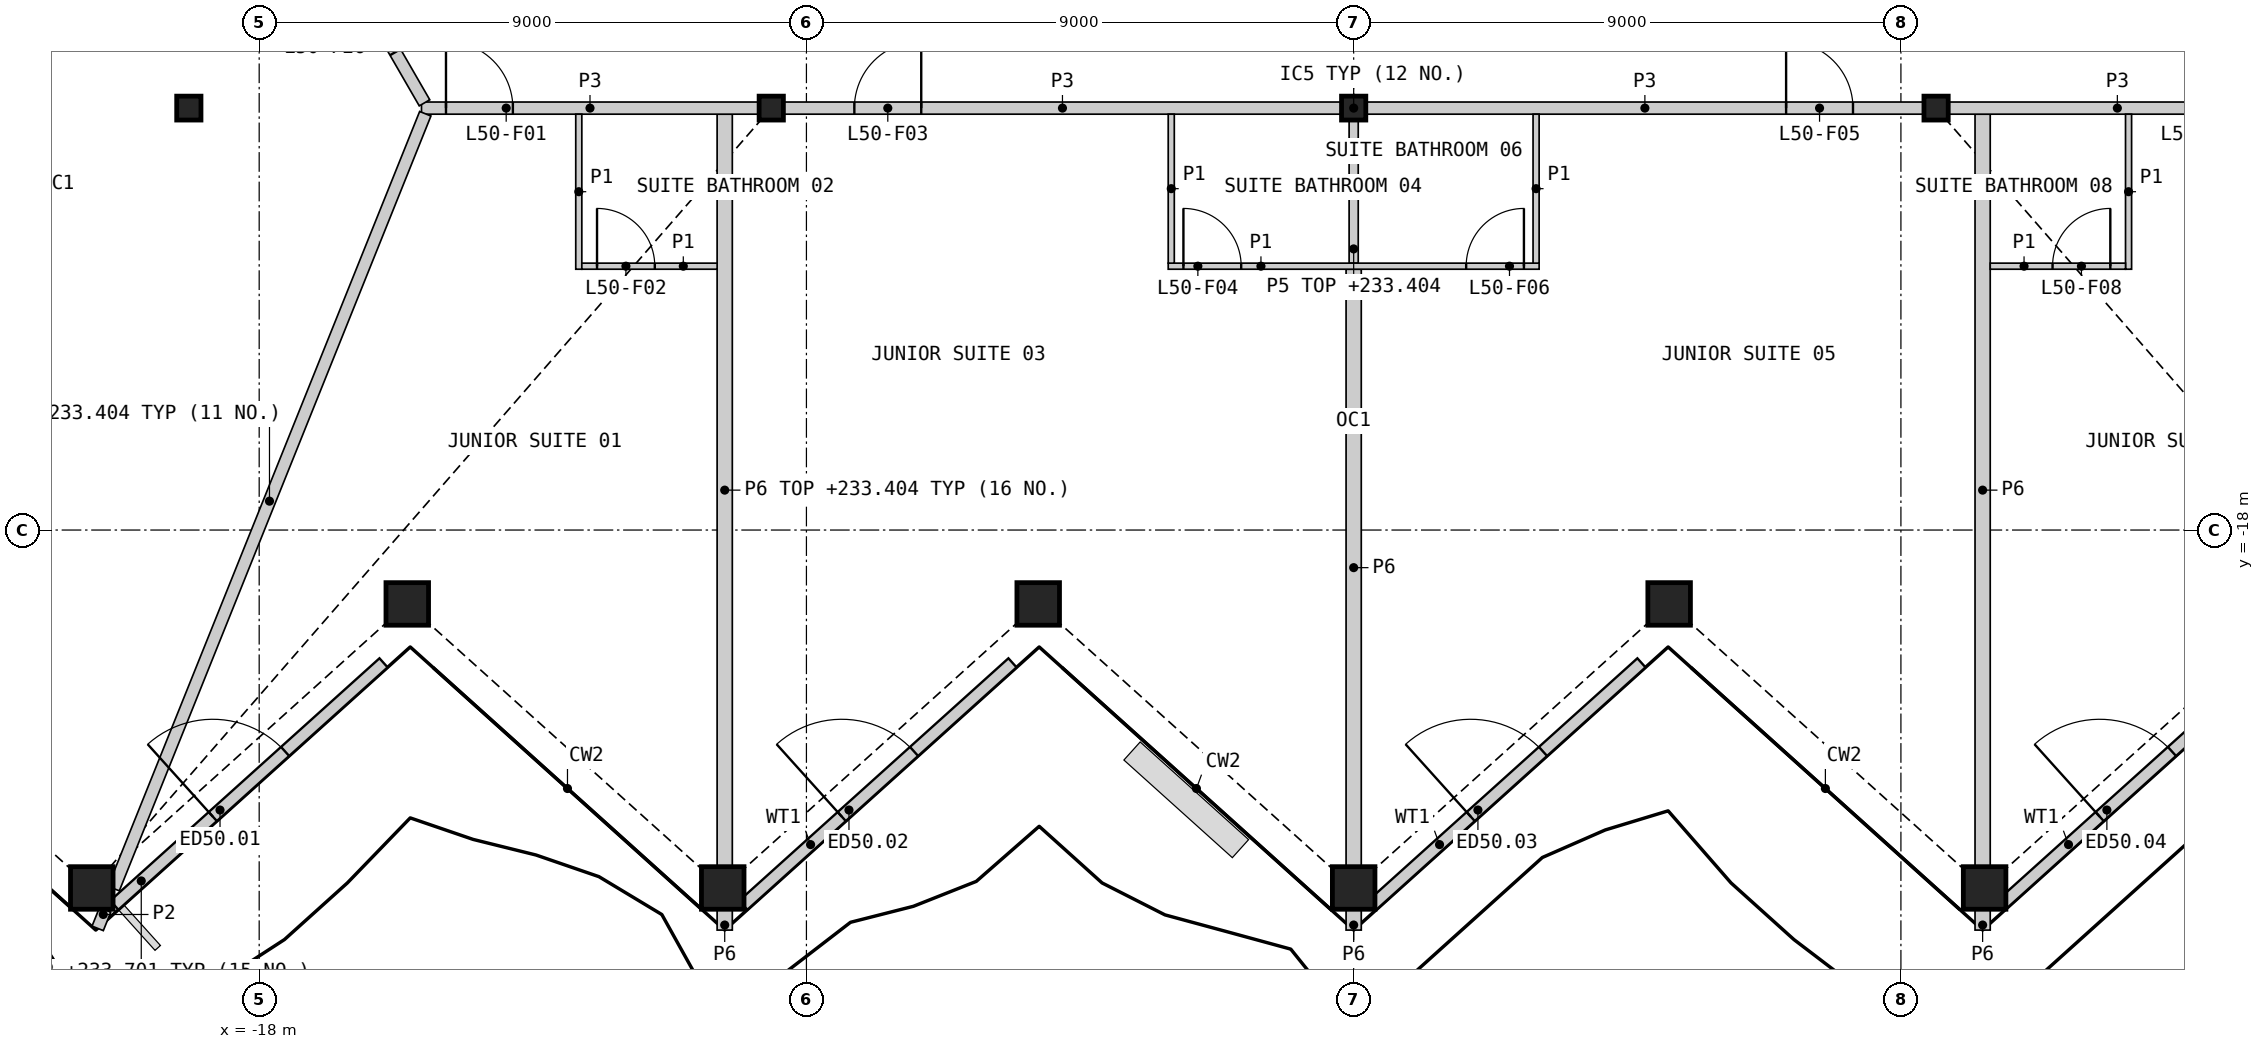
"""IFC4 building model, lengths in metres.
Left out: names, types, materials, properties, quantities, classifications, styles, units other than length and angle.
Written with IfcOpenShell. Run it as: python <this file> out.ifc"""

import sys

from ifc_helpers import new_model, si_unit, direction, frame, frame_2d, origin, origin_2d, place, context, subcontext, project, spatial, rectangle, hollow_rectangle, i_section, extrude, element, fill, save


model = new_model("IFC4")
c1 = context("Model", 3, precision=1e-05, world=origin(), true_north=direction((0.0, 1.0)))
c2 = subcontext(c1, "Body", "Model", "MODEL_VIEW")
j1 = project(units=[si_unit("LENGTHUNIT", "METRE"), si_unit("PLANEANGLEUNIT", "RADIAN")], contexts=[c1])
p1 = place(None, origin())
s1 = spatial("IfcSite", under=j1, at=p1, CompositionType="ELEMENT")
p2 = place(p1, origin())
s2 = spatial("IfcBuilding", under=s1, at=p2, CompositionType="ELEMENT")
p3 = place(p2, frame((0.0, 0.0, 231.0)))
s3 = spatial("IfcBuildingStorey", under=s2, at=p3, CompositionType="ELEMENT", Elevation=231.0)
for number, where, z_axis, x_axis in (
    (1, (-20.753, -23.887, 0.0), (0.0, 0.0, 1.0), (1.0, 0.0, 0.0)),
    (2, (-15.565, -19.215, 0.0), (0.0, 0.0, 1.0), (1.0, 0.0, 0.0)),
    (3, (-10.376, -23.887, 0.0), (0.0, 0.0, 1.0), (1.0, 0.0, 0.0)),
    (4, (-5.188, -19.215, 0.0), (0.0, 0.0, 1.0), (1.0, 0.0, 0.0)),
    (5, (0.0, -23.887, 0.0), (0.0, 0.0, 1.0), (1.0, 0.0, 0.0)),
    (6, (5.188, -19.215, 0.0), (0.0, 0.0, 1.0), (1.0, 0.0, 0.0)),
    (7, (10.376, -23.887, 0.0), (0.0, 0.0, 1.0), (1.0, 0.0, 0.0)),
):
    element("IfcColumn", number, at=place(p3, frame(where, z_axis=z_axis, x_axis=x_axis)), inside=s3, PredefinedType="COLUMN", context=c2, shape_type="SweptSolid", body=[
        extrude(hollow_rectangle(XDim=0.7, YDim=0.7, WallThickness=0.045, at=origin_2d()), origin(), (0.0, 0.0, 1.0), 3.6),
    ])
for number, where, z_axis, x_axis in (
    (8, (-19.157, -11.06, 0.0), (0.0, 0.0, 1.0), (1.0, 0.0, 0.0)),
    (9, (-9.578, -11.06, 0.0), (0.0, 0.0, 1.0), (1.0, 0.0, 0.0)),
    (10, (0.0, -11.06, 0.0), (0.0, 0.0, 1.0), (1.0, 0.0, 0.0)),
    (11, (9.578, -11.06, 0.0), (0.0, 0.0, 1.0), (1.0, 0.0, 0.0)),
):
    element("IfcColumn", number, at=place(p3, frame(where, z_axis=z_axis, x_axis=x_axis)), inside=s3, PredefinedType="COLUMN", context=c2, shape_type="SweptSolid", body=[
        extrude(i_section(OverallWidth=0.399, OverallDepth=0.393, WebThickness=0.023, FlangeThickness=0.037, at=origin_2d()), origin(), (0.0, 0.0, 1.0), 3.6),
    ])
p4 = place(p3, frame((-20.382, -24.17, 0.0), z_axis=(0.0, 0.0, 1.0), x_axis=(0.743161684399, 0.669111882155, 0.0)))
e12 = element("IfcWall", 12, at=p4, inside=s3, PredefinedType="SOLIDWALL", context=c2, shape_type="SweptSolid", body=[
    extrude(rectangle(XDim=5.958, YDim=0.2, at=frame_2d((2.979, 0.0))), origin(), (0.0, 0.0, 1.0), 2.701),
])
p5 = place(p4, frame((2.179, 0.0, 0.0)))
e13 = element("IfcOpeningElement", 13, at=p5, cuts=e12, PredefinedType="OPENING", context=c2, shape_type="SweptSolid", body=[
    extrude(rectangle(XDim=1.6, YDim=2.4, at=frame_2d((0.8, 1.2))), frame((0.0, 0.11, 0.0), z_axis=(0.0, -1.0, 0.0), x_axis=(1.0, 0.0, 0.0)), (0.0, 0.0, 1.0), 0.22),
])
p6 = place(p3, frame((-10.038, -24.17, 0.0), z_axis=(0.0, 0.0, 1.0), x_axis=(0.743143336638, 0.669132259878, 0.0)))
e14 = element("IfcWall", 14, at=p6, inside=s3, PredefinedType="SOLIDWALL", context=c2, shape_type="SweptSolid", body=[
    extrude(rectangle(XDim=5.958, YDim=0.2, at=frame_2d((2.979, 0.0))), origin(), (0.0, 0.0, 1.0), 2.701),
])
p7 = place(p6, frame((2.179, 0.0, 0.0)))
e15 = element("IfcOpeningElement", 15, at=p7, cuts=e14, PredefinedType="OPENING", context=c2, shape_type="SweptSolid", body=[
    extrude(rectangle(XDim=1.6, YDim=2.4, at=frame_2d((0.8, 1.2))), frame((0.0, 0.11, 0.0), z_axis=(0.0, -1.0, 0.0), x_axis=(1.0, 0.0, 0.0)), (0.0, 0.0, 1.0), 0.22),
])
p8 = place(p3, frame((0.305, -24.17, 0.0), z_axis=(0.0, 0.0, 1.0), x_axis=(0.743143336638, 0.669132259878, 0.0)))
e16 = element("IfcWall", 16, at=p8, inside=s3, PredefinedType="SOLIDWALL", context=c2, shape_type="SweptSolid", body=[
    extrude(rectangle(XDim=5.958, YDim=0.2, at=frame_2d((2.979, 0.0))), origin(), (0.0, 0.0, 1.0), 2.701),
])
p9 = place(p8, frame((2.179, 0.0, 0.0)))
e17 = element("IfcOpeningElement", 17, at=p9, cuts=e16, PredefinedType="OPENING", context=c2, shape_type="SweptSolid", body=[
    extrude(rectangle(XDim=1.6, YDim=2.4, at=frame_2d((0.8, 1.2))), frame((0.0, 0.11, 0.0), z_axis=(0.0, -1.0, 0.0), x_axis=(1.0, 0.0, 0.0)), (0.0, 0.0, 1.0), 0.22),
])
p10 = place(p3, frame((10.649, -24.17, 0.0), z_axis=(0.0, 0.0, 1.0), x_axis=(0.743143336638, 0.669132259878, 0.0)))
e18 = element("IfcWall", 18, at=p10, inside=s3, PredefinedType="SOLIDWALL", context=c2, shape_type="SweptSolid", body=[
    extrude(rectangle(XDim=5.958, YDim=0.2, at=frame_2d((2.979, 0.0))), origin(), (0.0, 0.0, 1.0), 2.701),
])
p11 = place(p10, frame((2.179, 0.0, 0.0)))
e19 = element("IfcOpeningElement", 19, at=p11, cuts=e18, PredefinedType="OPENING", context=c2, shape_type="SweptSolid", body=[
    extrude(rectangle(XDim=1.6, YDim=2.4, at=frame_2d((0.8, 1.2))), frame((0.0, 0.11, 0.0), z_axis=(0.0, -1.0, 0.0), x_axis=(1.0, 0.0, 0.0)), (0.0, 0.0, 1.0), 0.22),
])
for number, where, z_axis, x_axis in (
    (20, (-10.344, -23.527, 0.0), (0.0, 0.0, 1.0), (0.0, 1.0, 0.0)),
    (21, (10.344, -23.527, 0.0), (0.0, 0.0, 1.0), (0.0, 1.0, 0.0)),
):
    element("IfcWall", number, at=place(p3, frame(where, z_axis=z_axis, x_axis=x_axis)), inside=s3, PredefinedType="PARTITIONING", context=c2, shape_type="SweptSolid", body=[
        extrude(rectangle(XDim=12.366, YDim=0.25, at=frame_2d((6.183, 0.0))), origin(), (0.0, 0.0, 1.0), 2.404),
    ])
p12 = place(p3, frame((0.0, -23.527, 0.0), z_axis=(0.0, 0.0, 1.0), x_axis=(0.0, 1.0, 0.0)))
e22 = element("IfcWall", 22, at=p12, inside=s3, PredefinedType="PARTITIONING", context=c2, shape_type="SweptSolid", body=[
    extrude(rectangle(XDim=9.817, YDim=0.25, at=frame_2d((4.908, 0.0))), origin(), (0.0, 0.0, 1.0), 2.404),
])
p13 = place(p3, frame((-9.369, -11.06, 0.0), z_axis=(0.0, 0.0, 1.0), x_axis=(1.0, 0.0, 0.0)))
e23 = element("IfcWall", 23, at=p13, inside=s3, PredefinedType="PARTITIONING", context=c2, shape_type="SweptSolid", body=[
    extrude(rectangle(XDim=9.159, YDim=0.2, at=frame_2d((4.58, 0.0))), origin(), (0.0, 0.0, 1.0), 3.25),
])
p14 = place(p13, frame((1.157, 0.0, 0.0)))
e24 = element("IfcOpeningElement", 24, at=p14, cuts=e23, PredefinedType="OPENING", context=c2, shape_type="SweptSolid", body=[
    extrude(rectangle(XDim=1.1, YDim=2.1, at=frame_2d((0.55, 1.05))), frame((0.0, 0.11, 0.0), z_axis=(0.0, -1.0, 0.0), x_axis=(1.0, 0.0, 0.0)), (0.0, 0.0, 1.0), 0.22),
])
p15 = place(p3, frame((0.209, -11.06, 0.0), z_axis=(0.0, 0.0, 1.0), x_axis=(1.0, 0.0, 0.0)))
e25 = element("IfcWall", 25, at=p15, inside=s3, PredefinedType="PARTITIONING", context=c2, shape_type="SweptSolid", body=[
    extrude(rectangle(XDim=9.159, YDim=0.2, at=frame_2d((4.58, 0.0))), origin(), (0.0, 0.0, 1.0), 3.25),
])
p16 = place(p15, frame((6.902, 0.0, 0.0)))
e26 = element("IfcOpeningElement", 26, at=p16, cuts=e25, PredefinedType="OPENING", context=c2, shape_type="SweptSolid", body=[
    extrude(rectangle(XDim=1.1, YDim=2.1, at=frame_2d((0.55, 1.05))), frame((0.0, 0.11, 0.0), z_axis=(0.0, -1.0, 0.0), x_axis=(1.0, 0.0, 0.0)), (0.0, 0.0, 1.0), 0.22),
])
p17 = place(p3, frame((-15.331, -11.06, 0.0), z_axis=(0.0, 0.0, 1.0), x_axis=(1.0, 0.0, 0.0)))
e27 = element("IfcWall", 27, at=p17, inside=s3, PredefinedType="PARTITIONING", context=c2, shape_type="SweptSolid", body=[
    extrude(rectangle(XDim=5.543, YDim=0.2, at=frame_2d((2.771, 0.0))), origin(), (0.0, 0.0, 1.0), 3.25),
])
p18 = place(p17, frame((0.403, 0.0, 0.0)))
e28 = element("IfcOpeningElement", 28, at=p18, cuts=e27, PredefinedType="OPENING", context=c2, shape_type="SweptSolid", body=[
    extrude(rectangle(XDim=1.1, YDim=2.1, at=frame_2d((0.55, 1.05))), frame((0.0, 0.11, 0.0), z_axis=(0.0, -1.0, 0.0), x_axis=(1.0, 0.0, 0.0)), (0.0, 0.0, 1.0), 0.22),
])
p19 = place(p3, frame((9.788, -11.06, 0.0), z_axis=(0.0, 0.0, 1.0), x_axis=(1.0, 0.0, 0.0)))
e29 = element("IfcWall", 29, at=p19, inside=s3, PredefinedType="PARTITIONING", context=c2, shape_type="SweptSolid", body=[
    extrude(rectangle(XDim=5.543, YDim=0.2, at=frame_2d((2.771, 0.0))), origin(), (0.0, 0.0, 1.0), 3.25),
])
p20 = place(p19, frame((4.04, 0.0, 0.0)))
e30 = element("IfcOpeningElement", 30, at=p20, cuts=e29, PredefinedType="OPENING", context=c2, shape_type="SweptSolid", body=[
    extrude(rectangle(XDim=1.1, YDim=2.1, at=frame_2d((0.55, 1.05))), frame((0.0, 0.11, 0.0), z_axis=(0.0, -1.0, 0.0), x_axis=(1.0, 0.0, 0.0)), (0.0, 0.0, 1.0), 0.22),
])
p21 = place(p3, frame((-17.194, -7.66, 0.0), z_axis=(0.0, 0.0, 1.0), x_axis=(0.499989446428, -0.866031496806, 0.0)))
e31 = element("IfcWall", 31, at=p21, inside=s3, PredefinedType="PARTITIONING", context=c2, shape_type="SweptSolid", body=[
    extrude(rectangle(XDim=3.826, YDim=0.2, at=frame_2d((1.913, 0.0))), origin(), (0.0, 0.0, 1.0), 3.25),
])
p22 = place(p21, frame((1.064, 0.0, 0.0)))
e32 = element("IfcOpeningElement", 32, at=p22, cuts=e31, PredefinedType="OPENING", context=c2, shape_type="SweptSolid", body=[
    extrude(rectangle(XDim=1.8, YDim=2.1, at=frame_2d((0.9, 1.05))), frame((0.0, 0.11, 0.0), z_axis=(0.0, -1.0, 0.0), x_axis=(1.0, 0.0, 0.0)), (0.0, 0.0, 1.0), 0.22),
])
for number, where, z_axis, x_axis in (
    (33, (-10.344, -24.58, 0.0), (0.0, 0.0, 1.0), (0.0, 1.0, 0.0)),
    (34, (0.0, -24.58, 0.0), (0.0, 0.0, 1.0), (0.0, 1.0, 0.0)),
    (35, (10.344, -24.58, 0.0), (0.0, 0.0, 1.0), (0.0, 1.0, 0.0)),
):
    element("IfcWall", number, at=place(p3, frame(where, z_axis=z_axis, x_axis=x_axis)), inside=s3, PredefinedType="PARTITIONING", context=c2, shape_type="SweptSolid", body=[
        extrude(rectangle(XDim=0.333, YDim=0.25, at=frame_2d((0.167, 0.0))), origin(), (0.0, 0.0, 1.0), 2.404),
    ])
p23 = place(p3, frame((-20.393, -23.897, 0.0), z_axis=(0.0, 0.0, 1.0), x_axis=(0.373096979113, 0.927792349708, 0.0)))
e36 = element("IfcWall", 36, at=p23, inside=s3, PredefinedType="PARTITIONING", context=c2, shape_type="SweptSolid", body=[
    extrude(rectangle(XDim=13.736, YDim=0.2, at=frame_2d((6.868, 0.0))), origin(), (0.0, 0.0, 1.0), 2.404),
])
p24 = place(p3, frame((-20.656, -24.551, 0.0), z_axis=(0.0, 0.0, 1.0), x_axis=(0.372801499492, 0.927911117498, 0.0)))
e37 = element("IfcWall", 37, at=p24, inside=s3, PredefinedType="PARTITIONING", context=c2, shape_type="SweptSolid", body=[
    extrude(rectangle(XDim=0.328, YDim=0.2, at=frame_2d((0.164, 0.0))), origin(), (0.0, 0.0, 1.0), 2.404),
])
p25 = place(p3, frame((0.0, -13.61, 0.0), z_axis=(0.0, 0.0, 1.0), x_axis=(0.0, 1.0, 0.0)))
e38 = element("IfcWall", 38, at=p25, inside=s3, PredefinedType="PLUMBINGWALL", context=c2, shape_type="SweptSolid", body=[
    extrude(rectangle(XDim=2.341, YDim=0.15, at=frame_2d((1.17, 0.0))), origin(), (0.0, 0.0, 1.0), 2.404),
])
p26 = place(p3, frame((-3.05, -13.66, 0.0), z_axis=(0.0, 0.0, 1.0), x_axis=(1.0, 0.0, 0.0)))
e39 = element("IfcWall", 39, at=p26, inside=s3, PredefinedType="PARTITIONING", context=c2, shape_type="SweptSolid", body=[
    extrude(rectangle(XDim=6.1, YDim=0.1, at=frame_2d((3.05, 0.0))), origin(), (0.0, 0.0, 1.0), 2.404),
])
p27 = place(p26, frame((0.25, 0.0, 0.0)))
e40 = element("IfcOpeningElement", 40, at=p27, cuts=e39, PredefinedType="OPENING", context=c2, shape_type="SweptSolid", body=[
    extrude(rectangle(XDim=0.95, YDim=2.1, at=frame_2d((0.475, 1.05))), frame((0.0, 0.06, 0.0), z_axis=(0.0, -1.0, 0.0), x_axis=(1.0, 0.0, 0.0)), (0.0, 0.0, 1.0), 0.12),
])
p28 = place(p26, frame((4.9, 0.0, 0.0)))
e41 = element("IfcOpeningElement", 41, at=p28, cuts=e39, PredefinedType="OPENING", context=c2, shape_type="SweptSolid", body=[
    extrude(rectangle(XDim=0.95, YDim=2.1, at=frame_2d((0.475, 1.05))), frame((0.0, 0.06, 0.0), z_axis=(0.0, -1.0, 0.0), x_axis=(1.0, 0.0, 0.0)), (0.0, 0.0, 1.0), 0.12),
])
p29 = place(p3, frame((-12.744, -13.71, 0.0), z_axis=(0.0, 0.0, 1.0), x_axis=(0.0, 1.0, 0.0)))
e42 = element("IfcWall", 42, at=p29, inside=s3, PredefinedType="PARTITIONING", context=c2, shape_type="SweptSolid", body=[
    extrude(rectangle(XDim=2.55, YDim=0.1, at=frame_2d((1.275, 0.0))), origin(), (0.0, 0.0, 1.0), 2.404),
])
for number, where, z_axis, x_axis in (
    (43, (-3.0, -13.61, 0.0), (0.0, 0.0, 1.0), (0.0, 1.0, 0.0)),
    (44, (3.0, -13.61, 0.0), (0.0, 0.0, 1.0), (0.0, 1.0, 0.0)),
):
    element("IfcWall", number, at=place(p3, frame(where, z_axis=z_axis, x_axis=x_axis)), inside=s3, PredefinedType="PARTITIONING", context=c2, shape_type="SweptSolid", body=[
        extrude(rectangle(XDim=2.45, YDim=0.1, at=frame_2d((1.225, 0.0))), origin(), (0.0, 0.0, 1.0), 2.404),
    ])
p30 = place(p3, frame((12.744, -13.71, 0.0), z_axis=(0.0, 0.0, 1.0), x_axis=(0.0, 1.0, 0.0)))
e45 = element("IfcWall", 45, at=p30, inside=s3, PredefinedType="PARTITIONING", context=c2, shape_type="SweptSolid", body=[
    extrude(rectangle(XDim=2.55, YDim=0.1, at=frame_2d((1.275, 0.0))), origin(), (0.0, 0.0, 1.0), 2.404),
])
p31 = place(p3, frame((-12.694, -13.66, 0.0), z_axis=(0.0, 0.0, 1.0), x_axis=(1.0, 0.0, 0.0)))
e46 = element("IfcWall", 46, at=p31, inside=s3, PredefinedType="PARTITIONING", context=c2, shape_type="SweptSolid", body=[
    extrude(rectangle(XDim=2.225, YDim=0.1, at=frame_2d((1.113, 0.0))), origin(), (0.0, 0.0, 1.0), 2.404),
])
p32 = place(p31, frame((0.25, 0.0, 0.0)))
e47 = element("IfcOpeningElement", 47, at=p32, cuts=e46, PredefinedType="OPENING", context=c2, shape_type="SweptSolid", body=[
    extrude(rectangle(XDim=0.95, YDim=2.1, at=frame_2d((0.475, 1.05))), frame((0.0, 0.06, 0.0), z_axis=(0.0, -1.0, 0.0), x_axis=(1.0, 0.0, 0.0)), (0.0, 0.0, 1.0), 0.12),
])
p33 = place(p3, frame((10.469, -13.66, 0.0), z_axis=(0.0, 0.0, 1.0), x_axis=(1.0, 0.0, 0.0)))
e48 = element("IfcWall", 48, at=p33, inside=s3, PredefinedType="PARTITIONING", context=c2, shape_type="SweptSolid", body=[
    extrude(rectangle(XDim=2.225, YDim=0.1, at=frame_2d((1.113, 0.0))), origin(), (0.0, 0.0, 1.0), 2.404),
])
p34 = place(p33, frame((1.025, 0.0, 0.0)))
e49 = element("IfcOpeningElement", 49, at=p34, cuts=e48, PredefinedType="OPENING", context=c2, shape_type="SweptSolid", body=[
    extrude(rectangle(XDim=0.95, YDim=2.1, at=frame_2d((0.475, 1.05))), frame((0.0, 0.06, 0.0), z_axis=(0.0, -1.0, 0.0), x_axis=(1.0, 0.0, 0.0)), (0.0, 0.0, 1.0), 0.12),
])
p35 = place(p5, origin())
e50 = element("IfcDoor", 50, at=p35, inside=s3, OperationType="DOUBLE_DOOR_SINGLE_SWING", PredefinedType="DOOR", context=c2, shape_type="SweptSolid", body=[
    extrude(rectangle(XDim=1.6, YDim=2.4, at=frame_2d((0.8, 1.2))), frame((0.0, 0.025, 0.0), z_axis=(0.0, -1.0, 0.0), x_axis=(1.0, 0.0, 0.0)), (0.0, 0.0, 1.0), 0.05),
])
fill(e13, e50)
p36 = place(p7, origin())
e51 = element("IfcDoor", 51, at=p36, inside=s3, OperationType="DOUBLE_DOOR_SINGLE_SWING", PredefinedType="DOOR", context=c2, shape_type="SweptSolid", body=[
    extrude(rectangle(XDim=1.6, YDim=2.4, at=frame_2d((0.8, 1.2))), frame((0.0, 0.025, 0.0), z_axis=(0.0, -1.0, 0.0), x_axis=(1.0, 0.0, 0.0)), (0.0, 0.0, 1.0), 0.05),
])
fill(e15, e51)
p37 = place(p9, origin())
e52 = element("IfcDoor", 52, at=p37, inside=s3, OperationType="DOUBLE_DOOR_SINGLE_SWING", PredefinedType="DOOR", context=c2, shape_type="SweptSolid", body=[
    extrude(rectangle(XDim=1.6, YDim=2.4, at=frame_2d((0.8, 1.2))), frame((0.0, 0.025, 0.0), z_axis=(0.0, -1.0, 0.0), x_axis=(1.0, 0.0, 0.0)), (0.0, 0.0, 1.0), 0.05),
])
fill(e17, e52)
p38 = place(p11, origin())
e53 = element("IfcDoor", 53, at=p38, inside=s3, OperationType="DOUBLE_DOOR_SINGLE_SWING", PredefinedType="DOOR", context=c2, shape_type="SweptSolid", body=[
    extrude(rectangle(XDim=1.6, YDim=2.4, at=frame_2d((0.8, 1.2))), frame((0.0, 0.025, 0.0), z_axis=(0.0, -1.0, 0.0), x_axis=(1.0, 0.0, 0.0)), (0.0, 0.0, 1.0), 0.05),
])
fill(e19, e53)
p39 = place(p18, origin())
e54 = element("IfcDoor", 54, at=p39, inside=s3, OperationType="SINGLE_SWING_LEFT", PredefinedType="DOOR", context=c2, shape_type="SweptSolid", body=[
    extrude(rectangle(XDim=1.1, YDim=2.1, at=frame_2d((0.55, 1.05))), frame((0.0, 0.025, 0.0), z_axis=(0.0, -1.0, 0.0), x_axis=(1.0, 0.0, 0.0)), (0.0, 0.0, 1.0), 0.05),
])
fill(e28, e54)
p40 = place(p32, origin())
e55 = element("IfcDoor", 55, at=p40, inside=s3, OperationType="SINGLE_SWING_LEFT", PredefinedType="DOOR", context=c2, shape_type="SweptSolid", body=[
    extrude(rectangle(XDim=0.95, YDim=2.1, at=frame_2d((0.475, 1.05))), frame((0.0, 0.025, 0.0), z_axis=(0.0, -1.0, 0.0), x_axis=(1.0, 0.0, 0.0)), (0.0, 0.0, 1.0), 0.05),
])
fill(e47, e55)
p41 = place(p14, origin())
e56 = element("IfcDoor", 56, at=p41, inside=s3, OperationType="SINGLE_SWING_RIGHT", PredefinedType="DOOR", context=c2, shape_type="SweptSolid", body=[
    extrude(rectangle(XDim=1.1, YDim=2.1, at=frame_2d((0.55, 1.05))), frame((0.0, 0.025, 0.0), z_axis=(0.0, -1.0, 0.0), x_axis=(1.0, 0.0, 0.0)), (0.0, 0.0, 1.0), 0.05),
])
fill(e24, e56)
p42 = place(p27, origin())
e57 = element("IfcDoor", 57, at=p42, inside=s3, OperationType="SINGLE_SWING_LEFT", PredefinedType="DOOR", context=c2, shape_type="SweptSolid", body=[
    extrude(rectangle(XDim=0.95, YDim=2.1, at=frame_2d((0.475, 1.05))), frame((0.0, 0.025, 0.0), z_axis=(0.0, -1.0, 0.0), x_axis=(1.0, 0.0, 0.0)), (0.0, 0.0, 1.0), 0.05),
])
fill(e40, e57)
p43 = place(p16, origin())
e58 = element("IfcDoor", 58, at=p43, inside=s3, OperationType="SINGLE_SWING_LEFT", PredefinedType="DOOR", context=c2, shape_type="SweptSolid", body=[
    extrude(rectangle(XDim=1.1, YDim=2.1, at=frame_2d((0.55, 1.05))), frame((0.0, 0.025, 0.0), z_axis=(0.0, -1.0, 0.0), x_axis=(1.0, 0.0, 0.0)), (0.0, 0.0, 1.0), 0.05),
])
fill(e26, e58)
p44 = place(p28, origin())
e59 = element("IfcDoor", 59, at=p44, inside=s3, OperationType="SINGLE_SWING_RIGHT", PredefinedType="DOOR", context=c2, shape_type="SweptSolid", body=[
    extrude(rectangle(XDim=0.95, YDim=2.1, at=frame_2d((0.475, 1.05))), frame((0.0, 0.025, 0.0), z_axis=(0.0, -1.0, 0.0), x_axis=(1.0, 0.0, 0.0)), (0.0, 0.0, 1.0), 0.05),
])
fill(e41, e59)
p45 = place(p34, origin())
e60 = element("IfcDoor", 60, at=p45, inside=s3, OperationType="SINGLE_SWING_RIGHT", PredefinedType="DOOR", context=c2, shape_type="SweptSolid", body=[
    extrude(rectangle(XDim=0.95, YDim=2.1, at=frame_2d((0.475, 1.05))), frame((0.0, 0.025, 0.0), z_axis=(0.0, -1.0, 0.0), x_axis=(1.0, 0.0, 0.0)), (0.0, 0.0, 1.0), 0.05),
])
fill(e49, e60)
p46 = place(p22, origin())
e61 = element("IfcDoor", 61, at=p46, inside=s3, OperationType="DOUBLE_DOOR_SINGLE_SWING", PredefinedType="DOOR", context=c2, shape_type="SweptSolid", body=[
    extrude(rectangle(XDim=1.8, YDim=2.1, at=frame_2d((0.9, 1.05))), frame((0.0, 0.025, 0.0), z_axis=(0.0, -1.0, 0.0), x_axis=(1.0, 0.0, 0.0)), (0.0, 0.0, 1.0), 0.05),
])
fill(e32, e61)
save(model, sys.argv[1])
